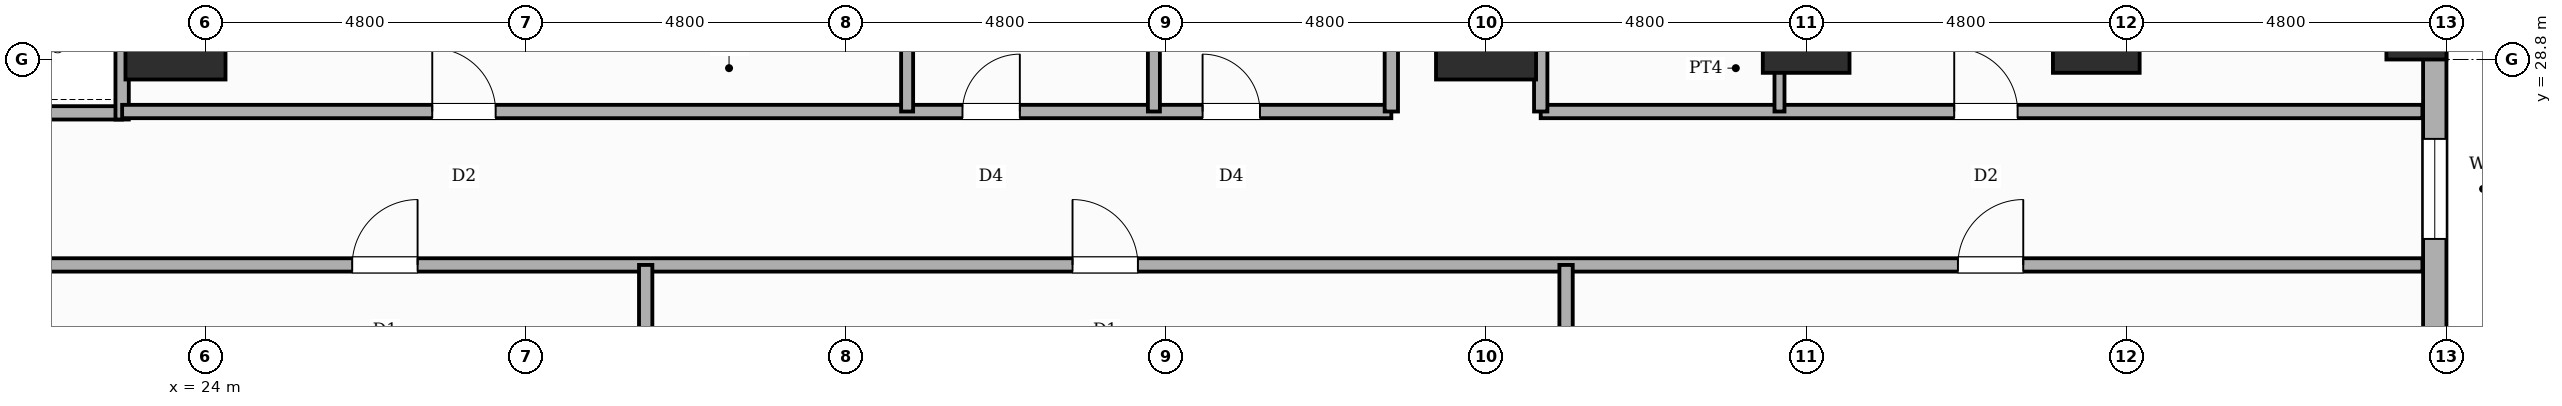
"""IFC4 building model, lengths in metres.
Left out: names, types, materials, properties, quantities, classifications, styles, units other than length and angle.
Written with IfcOpenShell. Run it as: python <this file> out.ifc"""

import sys

from ifc_helpers import new_model, si_unit, direction, frame, frame_2d, origin, origin_2d, place, context, subcontext, project, spatial, rectangle, circle, extrude, element, fill, save


model = new_model("IFC4")
c1 = context("Model", 3, precision=1e-05, world=origin(), true_north=direction((0.0, 1.0)))
c2 = subcontext(c1, "Body", "Model", "MODEL_VIEW")
j1 = project(units=[si_unit("LENGTHUNIT", "METRE"), si_unit("PLANEANGLEUNIT", "RADIAN")], contexts=[c1])
p1 = place(None, origin())
s1 = spatial("IfcSite", under=j1, at=p1, CompositionType="ELEMENT")
p2 = place(p1, origin())
s2 = spatial("IfcBuilding", under=s1, at=p2, CompositionType="ELEMENT")
p3 = place(p2, frame((0.0, 0.0, 19.6)))
s3 = spatial("IfcBuildingStorey", under=s2, at=p3, CompositionType="ELEMENT", Elevation=19.6)
for number, where, z_axis, x_axis in (
    (1, (23.55, 29.25, 0.0), (0.0, 0.0, 1.0), (1.0, 0.0, 0.0)),
    (2, (43.2, 29.25, 0.0), (0.0, 0.0, 1.0), (1.0, 0.0, 0.0)),
):
    element("IfcColumn", number, at=place(p3, frame(where, z_axis=z_axis, x_axis=x_axis)), inside=s3, PredefinedType="USERDEFINED", context=c2, shape_type="SweptSolid", body=[
        extrude(rectangle(XDim=1.5, YDim=1.5, at=origin_2d()), origin(), (0.0, 0.0, 1.0), 5.4),
    ])
for number, where, z_axis, x_axis in (
    (3, (48.0, 29.25, 0.0), (0.0, 0.0, 1.0), (1.0, 0.0, 0.0)),
    (4, (52.35, 29.25, 0.0), (0.0, 0.0, 1.0), (1.0, 0.0, 0.0)),
):
    element("IfcColumn", number, at=place(p3, frame(where, z_axis=z_axis, x_axis=x_axis)), inside=s3, PredefinedType="COLUMN", context=c2, shape_type="SweptSolid", body=[
        extrude(rectangle(XDim=1.3, YDim=1.3, at=origin_2d()), origin(), (0.0, 0.0, 1.0), 5.4),
    ])
p4 = place(p3, frame((57.15, 29.25, 0.0), z_axis=(0.0, 0.0, 1.0), x_axis=(1.0, 0.0, 0.0)))
e5 = element("IfcColumn", 5, at=p4, inside=s3, PredefinedType="COLUMN", context=c2, shape_type="SweptSolid", body=[
    extrude(circle(Radius=0.45, at=origin_2d()), origin(), (0.0, 0.0, 1.0), 5.4),
])
p5 = place(p3, frame((57.425, 48.0, 0.0), z_axis=(0.0, 0.0, 1.0), x_axis=(0.0, -1.0, 0.0)))
e6 = element("IfcWall", 6, at=p5, inside=s3, PredefinedType="STANDARD", context=c2, shape_type="SweptSolid", body=[
    extrude(rectangle(XDim=38.4, YDim=0.35, at=frame_2d((19.2, 0.0))), origin(), (0.0, 0.0, 1.0), 4.23),
])
p6 = place(p5, frame((20.39, 0.0, 0.85)))
e7 = element("IfcOpeningElement", 7, at=p6, cuts=e6, PredefinedType="OPENING", context=c2, shape_type="SweptSolid", body=[
    extrude(rectangle(XDim=1.5, YDim=2.1, at=frame_2d((0.75, 1.05))), frame((0.0, 0.185, 0.0), z_axis=(0.0, -1.0, 0.0), x_axis=(1.0, 0.0, 0.0)), (0.0, 0.0, 1.0), 0.37),
])
p7 = place(p5, frame((1.625, 0.0, 0.85)))
e8 = element("IfcOpeningElement", 8, at=p7, cuts=e6, PredefinedType="OPENING", context=c2, shape_type="SweptSolid", body=[
    extrude(rectangle(XDim=2.25, YDim=2.85, at=frame_2d((1.125, 1.425))), frame((0.0, 0.185, 0.0), z_axis=(0.0, -1.0, 0.0), x_axis=(1.0, 0.0, 0.0)), (0.0, 0.0, 1.0), 0.37),
])
p8 = place(p5, frame((24.21, 0.0, 0.85)))
e9 = element("IfcOpeningElement", 9, at=p8, cuts=e6, PredefinedType="OPENING", context=c2, shape_type="SweptSolid", body=[
    extrude(rectangle(XDim=2.25, YDim=2.85, at=frame_2d((1.125, 1.425))), frame((0.0, 0.185, 0.0), z_axis=(0.0, -1.0, 0.0), x_axis=(1.0, 0.0, 0.0)), (0.0, 0.0, 1.0), 0.37),
])
p9 = place(p3, frame((15.5, 28.0, 0.0), z_axis=(0.0, 0.0, 1.0), x_axis=(1.0, 0.0, 0.0)))
e10 = element("IfcWall", 10, at=p9, inside=s3, PredefinedType="POLYGONAL", context=c2, shape_type="SweptSolid", body=[
    extrude(rectangle(XDim=7.25, YDim=0.2, at=frame_2d((3.625, 0.0))), origin(), (0.0, 0.0, 1.0), 5.15),
])
p10 = place(p3, frame((22.75, 27.9, 0.0), z_axis=(0.0, 0.0, 1.0), x_axis=(0.0, 1.0, 0.0)))
e11 = element("IfcWall", 11, at=p10, inside=s3, PredefinedType="POLYGONAL", context=c2, shape_type="SweptSolid", body=[
    extrude(rectangle(XDim=3.0, YDim=0.2, at=frame_2d((1.5, 0.0))), origin(), (0.0, 0.0, 1.0), 5.15),
])
p11 = place(p3, frame((0.36, 25.72, 0.0), z_axis=(0.0, 0.0, 1.0), x_axis=(1.0, 0.0, 0.0)))
e12 = element("IfcWall", 12, at=p11, inside=s3, PredefinedType="PARTITIONING", context=c2, shape_type="SweptSolid", body=[
    extrude(rectangle(XDim=56.88, YDim=0.2, at=frame_2d((28.44, 0.0))), origin(), (0.0, 0.0, 1.0), 5.15),
])
p12 = place(p11, frame((6.84, 0.0, 0.0)))
e13 = element("IfcOpeningElement", 13, at=p12, cuts=e12, PredefinedType="OPENING", context=c2, shape_type="SweptSolid", body=[
    extrude(rectangle(XDim=0.98, YDim=2.18, at=frame_2d((0.49, 1.09))), frame((0.0, 0.11, 0.0), z_axis=(0.0, -1.0, 0.0), x_axis=(1.0, 0.0, 0.0)), (0.0, 0.0, 1.0), 0.22),
])
p13 = place(p11, frame((25.84, 0.0, 0.0)))
e14 = element("IfcOpeningElement", 14, at=p13, cuts=e12, PredefinedType="OPENING", context=c2, shape_type="SweptSolid", body=[
    extrude(rectangle(XDim=0.98, YDim=2.18, at=frame_2d((0.49, 1.09))), frame((0.0, 0.11, 0.0), z_axis=(0.0, -1.0, 0.0), x_axis=(1.0, 0.0, 0.0)), (0.0, 0.0, 1.0), 0.22),
])
p14 = place(p11, frame((36.64, 0.0, 0.0)))
e15 = element("IfcOpeningElement", 15, at=p14, cuts=e12, PredefinedType="OPENING", context=c2, shape_type="SweptSolid", body=[
    extrude(rectangle(XDim=0.98, YDim=2.18, at=frame_2d((0.49, 1.09))), frame((0.0, 0.11, 0.0), z_axis=(0.0, -1.0, 0.0), x_axis=(1.0, 0.0, 0.0)), (0.0, 0.0, 1.0), 0.22),
])
p15 = place(p11, frame((49.915, 0.0, 0.0)))
e16 = element("IfcOpeningElement", 16, at=p15, cuts=e12, PredefinedType="OPENING", context=c2, shape_type="SweptSolid", body=[
    extrude(rectangle(XDim=0.98, YDim=2.18, at=frame_2d((0.49, 1.09))), frame((0.0, 0.11, 0.0), z_axis=(0.0, -1.0, 0.0), x_axis=(1.0, 0.0, 0.0)), (0.0, 0.0, 1.0), 0.22),
])
p16 = place(p3, frame((22.75, 28.02, 0.0), z_axis=(0.0, 0.0, 1.0), x_axis=(1.0, 0.0, 0.0)))
e17 = element("IfcWall", 17, at=p16, inside=s3, PredefinedType="PARTITIONING", context=c2, shape_type="SweptSolid", body=[
    extrude(rectangle(XDim=19.03, YDim=0.2, at=frame_2d((9.515, 0.0))), origin(), (0.0, 0.0, 1.0), 5.15),
])
p17 = place(p16, frame((4.65, 0.0, 0.0)))
e18 = element("IfcOpeningElement", 18, at=p17, cuts=e17, PredefinedType="OPENING", context=c2, shape_type="SweptSolid", body=[
    extrude(rectangle(XDim=0.95, YDim=2.15, at=frame_2d((0.475, 1.075))), frame((0.0, 0.11, 0.0), z_axis=(0.0, -1.0, 0.0), x_axis=(1.0, 0.0, 0.0)), (0.0, 0.0, 1.0), 0.22),
])
p18 = place(p16, frame((12.6, 0.0, 0.0)))
e19 = element("IfcOpeningElement", 19, at=p18, cuts=e17, PredefinedType="OPENING", context=c2, shape_type="SweptSolid", body=[
    extrude(rectangle(XDim=0.86, YDim=2.1, at=frame_2d((0.43, 1.05))), frame((0.0, 0.11, 0.0), z_axis=(0.0, -1.0, 0.0), x_axis=(1.0, 0.0, 0.0)), (0.0, 0.0, 1.0), 0.22),
])
p19 = place(p16, frame((16.2, 0.0, 0.0)))
e20 = element("IfcOpeningElement", 20, at=p19, cuts=e17, PredefinedType="OPENING", context=c2, shape_type="SweptSolid", body=[
    extrude(rectangle(XDim=0.86, YDim=2.1, at=frame_2d((0.43, 1.05))), frame((0.0, 0.11, 0.0), z_axis=(0.0, -1.0, 0.0), x_axis=(1.0, 0.0, 0.0)), (0.0, 0.0, 1.0), 0.22),
])
p20 = place(p3, frame((44.02, 28.02, 0.0), z_axis=(0.0, 0.0, 1.0), x_axis=(1.0, 0.0, 0.0)))
e21 = element("IfcWall", 21, at=p20, inside=s3, PredefinedType="PARTITIONING", context=c2, shape_type="SweptSolid", body=[
    extrude(rectangle(XDim=13.22, YDim=0.2, at=frame_2d((6.61, 0.0))), origin(), (0.0, 0.0, 1.0), 5.15),
])
p21 = place(p20, frame((6.2, 0.0, 0.0)))
e22 = element("IfcOpeningElement", 22, at=p21, cuts=e21, PredefinedType="OPENING", context=c2, shape_type="SweptSolid", body=[
    extrude(rectangle(XDim=0.95, YDim=2.15, at=frame_2d((0.475, 1.075))), frame((0.0, 0.11, 0.0), z_axis=(0.0, -1.0, 0.0), x_axis=(1.0, 0.0, 0.0)), (0.0, 0.0, 1.0), 0.22),
])
p22 = place(p3, frame((41.78, 28.02, 0.0), z_axis=(0.0, 0.0, 1.0), x_axis=(0.0, 1.0, 0.0)))
e23 = element("IfcWall", 23, at=p22, inside=s3, PredefinedType="PARTITIONING", context=c2, shape_type="SweptSolid", body=[
    extrude(rectangle(XDim=10.28, YDim=0.2, at=frame_2d((5.14, 0.0))), origin(), (0.0, 0.0, 1.0), 5.15),
])
p23 = place(p22, frame((9.0, 0.0, 0.0)))
e24 = element("IfcOpeningElement", 24, at=p23, cuts=e23, PredefinedType="OPENING", context=c2, shape_type="SweptSolid", body=[
    extrude(rectangle(XDim=0.95, YDim=2.15, at=frame_2d((0.475, 1.075))), frame((0.0, 0.11, 0.0), z_axis=(0.0, -1.0, 0.0), x_axis=(1.0, 0.0, 0.0)), (0.0, 0.0, 1.0), 0.22),
])
p24 = place(p3, frame((44.02, 28.02, 0.0), z_axis=(0.0, 0.0, 1.0), x_axis=(0.0, 1.0, 0.0)))
e25 = element("IfcWall", 25, at=p24, inside=s3, PredefinedType="PARTITIONING", context=c2, shape_type="SweptSolid", body=[
    extrude(rectangle(XDim=8.1, YDim=0.2, at=frame_2d((4.05, 0.0))), origin(), (0.0, 0.0, 1.0), 5.15),
])
p25 = place(p3, frame((47.6, 28.02, 0.0), z_axis=(0.0, 0.0, 1.0), x_axis=(0.0, 1.0, 0.0)))
e26 = element("IfcWall", 26, at=p25, inside=s3, PredefinedType="PARTITIONING", context=c2, shape_type="SweptSolid", body=[
    extrude(rectangle(XDim=8.1, YDim=0.15, at=frame_2d((4.05, 0.0))), origin(), (0.0, 0.0, 1.0), 5.15),
])
for number, where, z_axis, x_axis in (
    (27, (30.6, 9.96, 0.0), (0.0, 0.0, 1.0), (0.0, 1.0, 0.0)),
    (28, (44.4, 9.96, 0.0), (0.0, 0.0, 1.0), (0.0, 1.0, 0.0)),
):
    element("IfcWall", number, at=place(p3, frame(where, z_axis=z_axis, x_axis=x_axis)), inside=s3, PredefinedType="SOLIDWALL", context=c2, shape_type="SweptSolid", body=[
        extrude(rectangle(XDim=15.76, YDim=0.2, at=frame_2d((7.88, 0.0))), origin(), (0.0, 0.0, 1.0), 5.15),
    ])
p26 = place(p3, frame((34.52, 28.02, 0.0), z_axis=(0.0, 0.0, 1.0), x_axis=(0.0, 1.0, 0.0)))
e29 = element("IfcWall", 29, at=p26, inside=s3, PredefinedType="PLUMBINGWALL", context=c2, shape_type="SweptSolid", body=[
    extrude(rectangle(XDim=19.62, YDim=0.18, at=frame_2d((9.81, 0.0))), origin(), (0.0, 0.0, 1.0), 5.15),
])
p27 = place(p3, frame((38.22, 28.02, 0.0), z_axis=(0.0, 0.0, 1.0), x_axis=(0.0, 1.0, 0.0)))
e30 = element("IfcWall", 30, at=p27, inside=s3, PredefinedType="PLUMBINGWALL", context=c2, shape_type="SweptSolid", body=[
    extrude(rectangle(XDim=6.03, YDim=0.18, at=frame_2d((3.015, 0.0))), origin(), (0.0, 0.0, 1.0), 4.23),
])
p28 = place(p6, origin())
e31 = element("IfcWindow", 31, at=p28, inside=s3, PartitioningType="SINGLE_PANEL", PredefinedType="WINDOW", context=c2, shape_type="SweptSolid", body=[
    extrude(rectangle(XDim=1.5, YDim=2.1, at=frame_2d((0.75, 1.05))), frame((0.0, 0.03, 0.0), z_axis=(0.0, -1.0, 0.0), x_axis=(1.0, 0.0, 0.0)), (0.0, 0.0, 1.0), 0.06),
])
fill(e7, e31)
p29 = place(p21, origin())
e32 = element("IfcDoor", 32, at=p29, inside=s3, OperationType="SINGLE_SWING_LEFT", PredefinedType="DOOR", context=c2, shape_type="SweptSolid", body=[
    extrude(rectangle(XDim=0.95, YDim=2.15, at=frame_2d((0.475, 1.075))), frame((0.0, 0.025, 0.0), z_axis=(0.0, -1.0, 0.0), x_axis=(1.0, 0.0, 0.0)), (0.0, 0.0, 1.0), 0.05),
])
fill(e22, e32)
p30 = place(p13, origin())
e33 = element("IfcDoor", 33, at=p30, inside=s3, OperationType="SINGLE_SWING_RIGHT", PredefinedType="DOOR", context=c2, shape_type="SweptSolid", body=[
    extrude(rectangle(XDim=0.98, YDim=2.18, at=frame_2d((0.49, 1.09))), frame((0.0, 0.025, 0.0), z_axis=(0.0, -1.0, 0.0), x_axis=(1.0, 0.0, 0.0)), (0.0, 0.0, 1.0), 0.05),
])
fill(e14, e33)
p31 = place(p14, origin())
e34 = element("IfcDoor", 34, at=p31, inside=s3, OperationType="SINGLE_SWING_LEFT", PredefinedType="DOOR", context=c2, shape_type="SweptSolid", body=[
    extrude(rectangle(XDim=0.98, YDim=2.18, at=frame_2d((0.49, 1.09))), frame((0.0, 0.025, 0.0), z_axis=(0.0, -1.0, 0.0), x_axis=(1.0, 0.0, 0.0)), (0.0, 0.0, 1.0), 0.05),
])
fill(e15, e34)
p32 = place(p15, origin())
e35 = element("IfcDoor", 35, at=p32, inside=s3, OperationType="SINGLE_SWING_RIGHT", PredefinedType="DOOR", context=c2, shape_type="SweptSolid", body=[
    extrude(rectangle(XDim=0.98, YDim=2.18, at=frame_2d((0.49, 1.09))), frame((0.0, 0.025, 0.0), z_axis=(0.0, -1.0, 0.0), x_axis=(1.0, 0.0, 0.0)), (0.0, 0.0, 1.0), 0.05),
])
fill(e16, e35)
p33 = place(p17, origin())
e36 = element("IfcDoor", 36, at=p33, inside=s3, OperationType="SINGLE_SWING_LEFT", PredefinedType="DOOR", context=c2, shape_type="SweptSolid", body=[
    extrude(rectangle(XDim=0.95, YDim=2.15, at=frame_2d((0.475, 1.075))), frame((0.0, 0.025, 0.0), z_axis=(0.0, -1.0, 0.0), x_axis=(1.0, 0.0, 0.0)), (0.0, 0.0, 1.0), 0.05),
])
fill(e18, e36)
p34 = place(p18, origin())
e37 = element("IfcDoor", 37, at=p34, inside=s3, OperationType="SINGLE_SWING_RIGHT", PredefinedType="DOOR", context=c2, shape_type="SweptSolid", body=[
    extrude(rectangle(XDim=0.86, YDim=2.1, at=frame_2d((0.43, 1.05))), frame((0.0, 0.025, 0.0), z_axis=(0.0, -1.0, 0.0), x_axis=(1.0, 0.0, 0.0)), (0.0, 0.0, 1.0), 0.05),
])
fill(e19, e37)
p35 = place(p19, origin())
e38 = element("IfcDoor", 38, at=p35, inside=s3, OperationType="SINGLE_SWING_LEFT", PredefinedType="DOOR", context=c2, shape_type="SweptSolid", body=[
    extrude(rectangle(XDim=0.86, YDim=2.1, at=frame_2d((0.43, 1.05))), frame((0.0, 0.025, 0.0), z_axis=(0.0, -1.0, 0.0), x_axis=(1.0, 0.0, 0.0)), (0.0, 0.0, 1.0), 0.05),
])
fill(e20, e38)
save(model, sys.argv[1])
